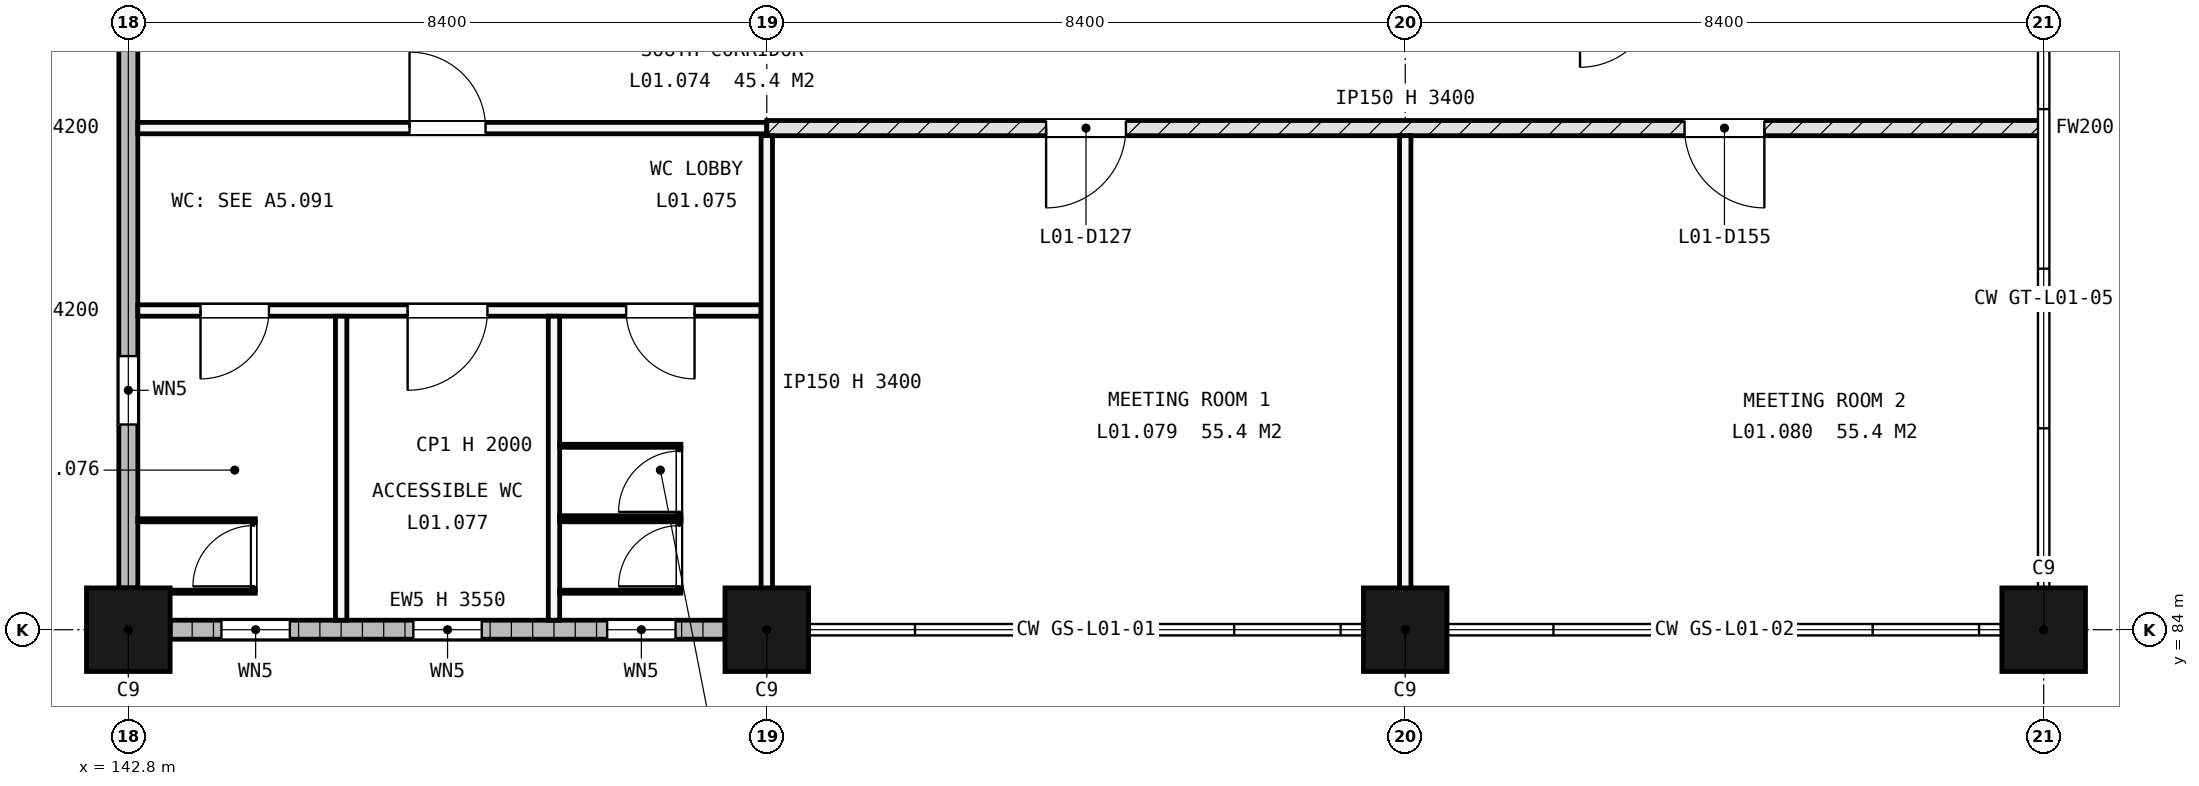
"""IFC4 building model, lengths in metres.
Left out: names, types, materials, properties, quantities, classifications, styles, units other than length and angle.
Written with IfcOpenShell. Run it as: python <this file> out.ifc"""

import sys

from ifc_helpers import new_model, si_unit, direction, frame, frame_2d, origin, origin_2d, place, context, subcontext, project, spatial, rectangle, extrude, element, fill, save


model = new_model("IFC4")
c1 = context("Model", 3, precision=1e-05, world=origin(), true_north=direction((0.0, 1.0)))
c2 = subcontext(c1, "Body", "Model", "MODEL_VIEW")
j1 = project(units=[si_unit("LENGTHUNIT", "METRE"), si_unit("PLANEANGLEUNIT", "RADIAN")], contexts=[c1])
p1 = place(None, origin())
s1 = spatial("IfcSite", under=j1, at=p1, CompositionType="ELEMENT")
p2 = place(p1, origin())
s2 = spatial("IfcBuilding", under=s1, at=p2, CompositionType="ELEMENT")
p3 = place(p2, frame((0.0, 0.0, 5.4)))
s3 = spatial("IfcBuildingStorey", under=s2, at=p3, CompositionType="ELEMENT", Elevation=5.4)
for number, where, z_axis, x_axis in (
    (1, (142.8, 84.0, -0.3), (0.0, 0.0, 1.0), (1.0, 0.0, 0.0)),
    (2, (151.2, 84.0, -0.3), (0.0, 0.0, 1.0), (1.0, 0.0, 0.0)),
    (3, (159.6, 84.0, -0.3), (0.0, 0.0, 1.0), (1.0, 0.0, 0.0)),
    (4, (168.0, 84.0, -0.3), (0.0, 0.0, 1.0), (1.0, 0.0, 0.0)),
):
    element("IfcColumn", number, at=place(p3, frame(where, z_axis=z_axis, x_axis=x_axis)), inside=s3, PredefinedType="COLUMN", context=c2, shape_type="SweptSolid", body=[
        extrude(rectangle(XDim=1.1, YDim=1.1, at=origin_2d()), origin(), (0.0, 0.0, 1.0), 4.55),
    ])
p4 = place(p3, frame((143.35, 84.0, 0.0), z_axis=(0.0, 0.0, 1.0), x_axis=(1.0, 0.0, 0.0)))
e5 = element("IfcWall", 5, at=p4, inside=s3, PredefinedType="STANDARD", context=c2, shape_type="SweptSolid", body=[
    extrude(rectangle(XDim=7.3, YDim=0.25, at=frame_2d((3.65, 0.0))), origin(), (0.0, 0.0, 1.0), 3.55),
])
p5 = place(p4, frame((0.675, 0.0, 2.1)))
e6 = element("IfcOpeningElement", 6, at=p5, cuts=e5, PredefinedType="OPENING", context=c2, shape_type="SweptSolid", body=[
    extrude(rectangle(XDim=0.9, YDim=0.6, at=frame_2d((0.45, 0.3))), frame((0.0, 0.135, 0.0), z_axis=(0.0, -1.0, 0.0), x_axis=(1.0, 0.0, 0.0)), (0.0, 0.0, 1.0), 0.27),
])
p6 = place(p4, frame((3.2, 0.0, 2.1)))
e7 = element("IfcOpeningElement", 7, at=p6, cuts=e5, PredefinedType="OPENING", context=c2, shape_type="SweptSolid", body=[
    extrude(rectangle(XDim=0.9, YDim=0.6, at=frame_2d((0.45, 0.3))), frame((0.0, 0.135, 0.0), z_axis=(0.0, -1.0, 0.0), x_axis=(1.0, 0.0, 0.0)), (0.0, 0.0, 1.0), 0.27),
])
p7 = place(p4, frame((5.75, 0.0, 2.1)))
e8 = element("IfcOpeningElement", 8, at=p7, cuts=e5, PredefinedType="OPENING", context=c2, shape_type="SweptSolid", body=[
    extrude(rectangle(XDim=0.9, YDim=0.6, at=frame_2d((0.45, 0.3))), frame((0.0, 0.135, 0.0), z_axis=(0.0, -1.0, 0.0), x_axis=(1.0, 0.0, 0.0)), (0.0, 0.0, 1.0), 0.27),
])
p8 = place(p3, frame((142.8, 84.55, 0.0), z_axis=(0.0, 0.0, 1.0), x_axis=(0.0, 1.0, 0.0)))
e9 = element("IfcWall", 9, at=p8, inside=s3, PredefinedType="STANDARD", context=c2, shape_type="SweptSolid", body=[
    extrude(rectangle(XDim=7.6, YDim=0.25, at=frame_2d((3.8, 0.0))), origin(), (0.0, 0.0, 1.0), 4.2),
])
p9 = place(p8, frame((2.15, 0.0, 2.1)))
e10 = element("IfcOpeningElement", 10, at=p9, cuts=e9, PredefinedType="OPENING", context=c2, shape_type="SweptSolid", body=[
    extrude(rectangle(XDim=0.9, YDim=0.6, at=frame_2d((0.45, 0.3))), frame((0.0, 0.135, 0.0), z_axis=(0.0, -1.0, 0.0), x_axis=(1.0, 0.0, 0.0)), (0.0, 0.0, 1.0), 0.27),
])
p10 = place(p3, frame((142.925, 88.2, 0.0), z_axis=(0.0, 0.0, 1.0), x_axis=(1.0, 0.0, 0.0)))
e11 = element("IfcWall", 11, at=p10, inside=s3, PredefinedType="PARTITIONING", context=c2, shape_type="SweptSolid", body=[
    extrude(rectangle(XDim=8.2, YDim=0.15, at=frame_2d((4.1, 0.0))), origin(), (0.0, 0.0, 1.0), 4.2),
])
p11 = place(p10, frame((0.825, 0.0, 0.0)))
e12 = element("IfcOpeningElement", 12, at=p11, cuts=e11, PredefinedType="OPENING", context=c2, shape_type="SweptSolid", body=[
    extrude(rectangle(XDim=0.9, YDim=2.1, at=frame_2d((0.45, 1.05))), frame((0.0, 0.085, 0.0), z_axis=(0.0, -1.0, 0.0), x_axis=(1.0, 0.0, 0.0)), (0.0, 0.0, 1.0), 0.17),
])
p12 = place(p10, frame((3.55, 0.0, 0.0)))
e13 = element("IfcOpeningElement", 13, at=p12, cuts=e11, PredefinedType="OPENING", context=c2, shape_type="SweptSolid", body=[
    extrude(rectangle(XDim=1.05, YDim=2.25, at=frame_2d((0.525, 1.125))), frame((0.0, 0.085, 0.0), z_axis=(0.0, -1.0, 0.0), x_axis=(1.0, 0.0, 0.0)), (0.0, 0.0, 1.0), 0.17),
])
p13 = place(p10, frame((6.425, 0.0, 0.0)))
e14 = element("IfcOpeningElement", 14, at=p13, cuts=e11, PredefinedType="OPENING", context=c2, shape_type="SweptSolid", body=[
    extrude(rectangle(XDim=0.9, YDim=2.1, at=frame_2d((0.45, 1.05))), frame((0.0, 0.085, 0.0), z_axis=(0.0, -1.0, 0.0), x_axis=(1.0, 0.0, 0.0)), (0.0, 0.0, 1.0), 0.17),
])
p14 = place(p3, frame((142.925, 90.6, 0.0), z_axis=(0.0, 0.0, 1.0), x_axis=(1.0, 0.0, 0.0)))
e15 = element("IfcWall", 15, at=p14, inside=s3, PredefinedType="PARTITIONING", context=c2, shape_type="SweptSolid", body=[
    extrude(rectangle(XDim=8.275, YDim=0.15, at=frame_2d((4.137, 0.0))), origin(), (0.0, 0.0, 1.0), 4.2),
])
p15 = place(p14, frame((3.575, 0.0, 0.0)))
e16 = element("IfcOpeningElement", 16, at=p15, cuts=e15, PredefinedType="OPENING", context=c2, shape_type="SweptSolid", body=[
    extrude(rectangle(XDim=1.0, YDim=2.1, at=frame_2d((0.5, 1.05))), frame((0.0, 0.085, 0.0), z_axis=(0.0, -1.0, 0.0), x_axis=(1.0, 0.0, 0.0)), (0.0, 0.0, 1.0), 0.17),
])
p16 = place(p3, frame((151.2, 90.6, 0.0), z_axis=(0.0, 0.0, 1.0), x_axis=(1.0, 0.0, 0.0)))
e17 = element("IfcWall", 17, at=p16, inside=s3, PredefinedType="SOLIDWALL", context=c2, shape_type="SweptSolid", body=[
    extrude(rectangle(XDim=16.8, YDim=0.2, at=frame_2d((8.4, 0.0))), origin(), (0.0, 0.0, 1.0), 4.2),
])
p17 = place(p16, frame((3.675, 0.0, 0.0)))
e18 = element("IfcOpeningElement", 18, at=p17, cuts=e17, PredefinedType="OPENING", context=c2, shape_type="SweptSolid", body=[
    extrude(rectangle(XDim=1.05, YDim=2.1, at=frame_2d((0.525, 1.05))), frame((0.0, 0.11, 0.0), z_axis=(0.0, -1.0, 0.0), x_axis=(1.0, 0.0, 0.0)), (0.0, 0.0, 1.0), 0.22),
])
p18 = place(p16, frame((12.075, 0.0, 0.0)))
e19 = element("IfcOpeningElement", 19, at=p18, cuts=e17, PredefinedType="OPENING", context=c2, shape_type="SweptSolid", body=[
    extrude(rectangle(XDim=1.05, YDim=2.1, at=frame_2d((0.525, 1.05))), frame((0.0, 0.11, 0.0), z_axis=(0.0, -1.0, 0.0), x_axis=(1.0, 0.0, 0.0)), (0.0, 0.0, 1.0), 0.22),
])
for number, where, z_axis, x_axis in (
    (20, (145.6, 84.125, 0.0), (0.0, 0.0, 1.0), (0.0, 1.0, 0.0)),
    (21, (148.4, 84.125, 0.0), (0.0, 0.0, 1.0), (0.0, 1.0, 0.0)),
):
    element("IfcWall", number, at=place(p3, frame(where, z_axis=z_axis, x_axis=x_axis)), inside=s3, PredefinedType="PARTITIONING", context=c2, shape_type="SweptSolid", body=[
        extrude(rectangle(XDim=4.0, YDim=0.15, at=frame_2d((2.0, 0.0))), origin(), (0.0, 0.0, 1.0), 4.2),
    ])
for number, where, z_axis, x_axis in (
    (22, (151.2, 84.0, 0.0), (0.0, 0.0, 1.0), (0.0, 1.0, 0.0)),
    (23, (159.6, 84.0, 0.0), (0.0, 0.0, 1.0), (0.0, 1.0, 0.0)),
):
    element("IfcWall", number, at=place(p3, frame(where, z_axis=z_axis, x_axis=x_axis)), inside=s3, PredefinedType="PARTITIONING", context=c2, shape_type="SweptSolid", body=[
        extrude(rectangle(XDim=6.5, YDim=0.15, at=frame_2d((3.25, 0.0))), origin(), (0.0, 0.0, 1.0), 3.4),
    ])
p19 = place(p3, frame((142.93, 84.5, 0.0), z_axis=(0.0, 0.0, 1.0), x_axis=(1.0, 0.0, 0.0)))
e24 = element("IfcWall", 24, at=p19, inside=s3, PredefinedType="PARTITIONING", context=c2, shape_type="SweptSolid", body=[
    extrude(rectangle(XDim=1.54, YDim=0.04, at=frame_2d((0.77, 0.0))), origin(), (0.0, 0.0, 1.0), 2.0),
])
p20 = place(p3, frame((142.925, 85.44, 0.0), z_axis=(0.0, 0.0, 1.0), x_axis=(1.0, 0.0, 0.0)))
e25 = element("IfcWall", 25, at=p20, inside=s3, PredefinedType="PARTITIONING", context=c2, shape_type="SweptSolid", body=[
    extrude(rectangle(XDim=1.545, YDim=0.04, at=frame_2d((0.772, 0.0))), origin(), (0.0, 0.0, 1.0), 2.0),
])
p21 = place(p3, frame((144.45, 84.52, 0.0), z_axis=(0.0, 0.0, 1.0), x_axis=(0.0, 1.0, 0.0)))
e26 = element("IfcWall", 26, at=p21, inside=s3, PredefinedType="PARTITIONING", context=c2, shape_type="SweptSolid", body=[
    extrude(rectangle(XDim=0.9, YDim=0.04, at=frame_2d((0.45, 0.0))), origin(), (0.0, 0.0, 1.0), 2.0),
])
p22 = place(p21, frame((0.05, 0.0, 0.0)))
e27 = element("IfcOpeningElement", 27, at=p22, cuts=e26, PredefinedType="OPENING", context=c2, shape_type="SweptSolid", body=[
    extrude(rectangle(XDim=0.8, YDim=2.0, at=frame_2d((0.4, 1.0))), frame((0.0, 0.03, 0.0), z_axis=(0.0, -1.0, 0.0), x_axis=(1.0, 0.0, 0.0)), (0.0, 0.0, 1.0), 0.06),
])
for number, where, z_axis, x_axis in (
    (28, (148.475, 84.5, 0.0), (0.0, 0.0, 1.0), (1.0, 0.0, 0.0)),
    (29, (148.475, 85.44, 0.0), (0.0, 0.0, 1.0), (1.0, 0.0, 0.0)),
):
    element("IfcWall", number, at=place(p3, frame(where, z_axis=z_axis, x_axis=x_axis)), inside=s3, PredefinedType="PARTITIONING", context=c2, shape_type="SweptSolid", body=[
        extrude(rectangle(XDim=1.595, YDim=0.04, at=frame_2d((0.797, 0.0))), origin(), (0.0, 0.0, 1.0), 2.0),
    ])
p23 = place(p3, frame((150.05, 84.52, 0.0), z_axis=(0.0, 0.0, 1.0), x_axis=(0.0, 1.0, 0.0)))
e30 = element("IfcWall", 30, at=p23, inside=s3, PredefinedType="PARTITIONING", context=c2, shape_type="SweptSolid", body=[
    extrude(rectangle(XDim=0.9, YDim=0.04, at=frame_2d((0.45, 0.0))), origin(), (0.0, 0.0, 1.0), 2.0),
])
p24 = place(p23, frame((0.05, 0.0, 0.0)))
e31 = element("IfcOpeningElement", 31, at=p24, cuts=e30, PredefinedType="OPENING", context=c2, shape_type="SweptSolid", body=[
    extrude(rectangle(XDim=0.8, YDim=2.0, at=frame_2d((0.4, 1.0))), frame((0.0, 0.03, 0.0), z_axis=(0.0, -1.0, 0.0), x_axis=(1.0, 0.0, 0.0)), (0.0, 0.0, 1.0), 0.06),
])
for number, where, z_axis, x_axis in (
    (32, (148.475, 85.48, 0.0), (0.0, 0.0, 1.0), (1.0, 0.0, 0.0)),
    (33, (148.475, 86.42, 0.0), (0.0, 0.0, 1.0), (1.0, 0.0, 0.0)),
):
    element("IfcWall", number, at=place(p3, frame(where, z_axis=z_axis, x_axis=x_axis)), inside=s3, PredefinedType="PARTITIONING", context=c2, shape_type="SweptSolid", body=[
        extrude(rectangle(XDim=1.595, YDim=0.04, at=frame_2d((0.797, 0.0))), origin(), (0.0, 0.0, 1.0), 2.0),
    ])
p25 = place(p3, frame((150.05, 85.5, 0.0), z_axis=(0.0, 0.0, 1.0), x_axis=(0.0, 1.0, 0.0)))
e34 = element("IfcWall", 34, at=p25, inside=s3, PredefinedType="PARTITIONING", context=c2, shape_type="SweptSolid", body=[
    extrude(rectangle(XDim=0.9, YDim=0.04, at=frame_2d((0.45, 0.0))), origin(), (0.0, 0.0, 1.0), 2.0),
])
p26 = place(p25, frame((0.05, 0.0, 0.0)))
e35 = element("IfcOpeningElement", 35, at=p26, cuts=e34, PredefinedType="OPENING", context=c2, shape_type="SweptSolid", body=[
    extrude(rectangle(XDim=0.8, YDim=2.0, at=frame_2d((0.4, 1.0))), frame((0.0, 0.03, 0.0), z_axis=(0.0, -1.0, 0.0), x_axis=(1.0, 0.0, 0.0)), (0.0, 0.0, 1.0), 0.06),
])
p27 = place(p5, origin())
e36 = element("IfcWindow", 36, at=p27, inside=s3, PartitioningType="SINGLE_PANEL", PredefinedType="WINDOW", context=c2, shape_type="SweptSolid", body=[
    extrude(rectangle(XDim=0.9, YDim=0.6, at=frame_2d((0.45, 0.3))), frame((0.0, 0.03, 0.0), z_axis=(0.0, -1.0, 0.0), x_axis=(1.0, 0.0, 0.0)), (0.0, 0.0, 1.0), 0.06),
])
fill(e6, e36)
p28 = place(p6, origin())
e37 = element("IfcWindow", 37, at=p28, inside=s3, PartitioningType="SINGLE_PANEL", PredefinedType="WINDOW", context=c2, shape_type="SweptSolid", body=[
    extrude(rectangle(XDim=0.9, YDim=0.6, at=frame_2d((0.45, 0.3))), frame((0.0, 0.03, 0.0), z_axis=(0.0, -1.0, 0.0), x_axis=(1.0, 0.0, 0.0)), (0.0, 0.0, 1.0), 0.06),
])
fill(e7, e37)
p29 = place(p7, origin())
e38 = element("IfcWindow", 38, at=p29, inside=s3, PartitioningType="SINGLE_PANEL", PredefinedType="WINDOW", context=c2, shape_type="SweptSolid", body=[
    extrude(rectangle(XDim=0.9, YDim=0.6, at=frame_2d((0.45, 0.3))), frame((0.0, 0.03, 0.0), z_axis=(0.0, -1.0, 0.0), x_axis=(1.0, 0.0, 0.0)), (0.0, 0.0, 1.0), 0.06),
])
fill(e8, e38)
p30 = place(p9, origin())
e39 = element("IfcWindow", 39, at=p30, inside=s3, PartitioningType="SINGLE_PANEL", PredefinedType="WINDOW", context=c2, shape_type="SweptSolid", body=[
    extrude(rectangle(XDim=0.9, YDim=0.6, at=frame_2d((0.45, 0.3))), frame((0.0, 0.03, 0.0), z_axis=(0.0, -1.0, 0.0), x_axis=(1.0, 0.0, 0.0)), (0.0, 0.0, 1.0), 0.06),
])
fill(e10, e39)
p31 = place(p11, origin())
e40 = element("IfcDoor", 40, at=p31, inside=s3, OperationType="SINGLE_SWING_LEFT", PredefinedType="DOOR", context=c2, shape_type="SweptSolid", body=[
    extrude(rectangle(XDim=0.9, YDim=2.1, at=frame_2d((0.45, 1.05))), frame((0.0, 0.025, 0.0), z_axis=(0.0, -1.0, 0.0), x_axis=(1.0, 0.0, 0.0)), (0.0, 0.0, 1.0), 0.05),
])
fill(e12, e40)
p32 = place(p12, origin())
e41 = element("IfcDoor", 41, at=p32, inside=s3, OperationType="SINGLE_SWING_LEFT", PredefinedType="DOOR", context=c2, shape_type="SweptSolid", body=[
    extrude(rectangle(XDim=1.05, YDim=2.25, at=frame_2d((0.525, 1.125))), frame((0.0, 0.025, 0.0), z_axis=(0.0, -1.0, 0.0), x_axis=(1.0, 0.0, 0.0)), (0.0, 0.0, 1.0), 0.05),
])
fill(e13, e41)
p33 = place(p13, origin())
e42 = element("IfcDoor", 42, at=p33, inside=s3, OperationType="SINGLE_SWING_RIGHT", PredefinedType="DOOR", context=c2, shape_type="SweptSolid", body=[
    extrude(rectangle(XDim=0.9, YDim=2.1, at=frame_2d((0.45, 1.05))), frame((0.0, 0.025, 0.0), z_axis=(0.0, -1.0, 0.0), x_axis=(1.0, 0.0, 0.0)), (0.0, 0.0, 1.0), 0.05),
])
fill(e14, e42)
p34 = place(p17, origin())
e43 = element("IfcDoor", 43, at=p34, inside=s3, OperationType="SINGLE_SWING_LEFT", PredefinedType="DOOR", context=c2, shape_type="SweptSolid", body=[
    extrude(rectangle(XDim=1.05, YDim=2.1, at=frame_2d((0.525, 1.05))), frame((0.0, 0.025, 0.0), z_axis=(0.0, -1.0, 0.0), x_axis=(1.0, 0.0, 0.0)), (0.0, 0.0, 1.0), 0.05),
])
fill(e18, e43)
p35 = place(p18, origin())
e44 = element("IfcDoor", 44, at=p35, inside=s3, OperationType="SINGLE_SWING_RIGHT", PredefinedType="DOOR", context=c2, shape_type="SweptSolid", body=[
    extrude(rectangle(XDim=1.05, YDim=2.1, at=frame_2d((0.525, 1.05))), frame((0.0, 0.025, 0.0), z_axis=(0.0, -1.0, 0.0), x_axis=(1.0, 0.0, 0.0)), (0.0, 0.0, 1.0), 0.05),
])
fill(e19, e44)
p36 = place(p15, origin())
e45 = element("IfcDoor", 45, at=p36, inside=s3, OperationType="SINGLE_SWING_RIGHT", PredefinedType="DOOR", context=c2, shape_type="SweptSolid", body=[
    extrude(rectangle(XDim=1.0, YDim=2.1, at=frame_2d((0.5, 1.05))), frame((0.0, 0.025, 0.0), z_axis=(0.0, -1.0, 0.0), x_axis=(1.0, 0.0, 0.0)), (0.0, 0.0, 1.0), 0.05),
])
fill(e16, e45)
p37 = place(p22, origin())
e46 = element("IfcDoor", 46, at=p37, inside=s3, OperationType="SINGLE_SWING_LEFT", PredefinedType="DOOR", context=c2, shape_type="SweptSolid", body=[
    extrude(rectangle(XDim=0.8, YDim=2.0, at=frame_2d((0.4, 1.0))), frame((0.0, 0.02, 0.0), z_axis=(0.0, -1.0, 0.0), x_axis=(1.0, 0.0, 0.0)), (0.0, 0.0, 1.0), 0.04),
])
fill(e27, e46)
p38 = place(p24, origin())
e47 = element("IfcDoor", 47, at=p38, inside=s3, OperationType="SINGLE_SWING_LEFT", PredefinedType="DOOR", context=c2, shape_type="SweptSolid", body=[
    extrude(rectangle(XDim=0.8, YDim=2.0, at=frame_2d((0.4, 1.0))), frame((0.0, 0.02, 0.0), z_axis=(0.0, -1.0, 0.0), x_axis=(1.0, 0.0, 0.0)), (0.0, 0.0, 1.0), 0.04),
])
fill(e31, e47)
p39 = place(p26, origin())
e48 = element("IfcDoor", 48, at=p39, inside=s3, OperationType="SINGLE_SWING_LEFT", PredefinedType="DOOR", context=c2, shape_type="SweptSolid", body=[
    extrude(rectangle(XDim=0.8, YDim=2.0, at=frame_2d((0.4, 1.0))), frame((0.0, 0.02, 0.0), z_axis=(0.0, -1.0, 0.0), x_axis=(1.0, 0.0, 0.0)), (0.0, 0.0, 1.0), 0.04),
])
fill(e35, e48)
save(model, sys.argv[1])
